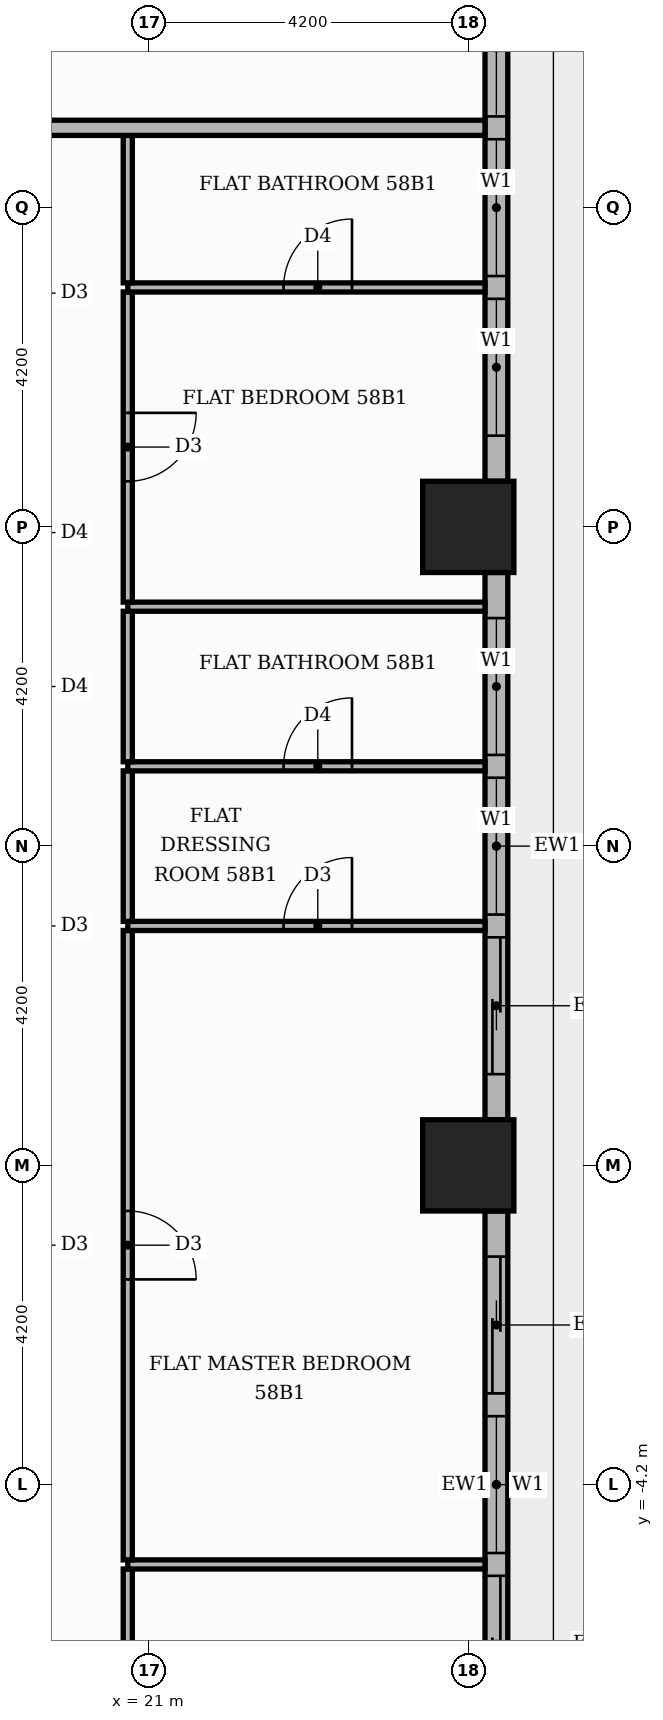
"""IFC4 building model, lengths in metres.
Left out: names, types, materials, properties, quantities, classifications, styles, units other than length and angle.
Written with IfcOpenShell. Run it as: python <this file> out.ifc"""

import sys

from ifc_helpers import new_model, si_unit, direction, frame, frame_2d, origin, origin_2d, place, context, subcontext, project, spatial, rectangle, extrude, element, fill, save


model = new_model("IFC4")
c1 = context("Model", 3, precision=1e-05, world=origin(), true_north=direction((0.0, 1.0)))
c2 = subcontext(c1, "Body", "Model", "MODEL_VIEW")
j1 = project(units=[si_unit("LENGTHUNIT", "METRE"), si_unit("PLANEANGLEUNIT", "RADIAN")], contexts=[c1])
p1 = place(None, origin())
s1 = spatial("IfcSite", under=j1, at=p1, CompositionType="ELEMENT")
p2 = place(p1, origin())
s2 = spatial("IfcBuilding", under=s1, at=p2, CompositionType="ELEMENT")
p3 = place(p2, frame((0.0, 0.0, 244.5)))
s3 = spatial("IfcBuildingStorey", under=s2, at=p3, CompositionType="ELEMENT", Elevation=244.5)
for number, where, z_axis, x_axis in (
    (1, (25.2, 0.0, 0.0), (0.0, 0.0, 1.0), (1.0, 0.0, 0.0)),
    (2, (25.2, 8.4, 0.0), (0.0, 0.0, 1.0), (1.0, 0.0, 0.0)),
):
    element("IfcColumn", number, at=place(p3, frame(where, z_axis=z_axis, x_axis=x_axis)), inside=s3, PredefinedType="COLUMN", context=c2, shape_type="SweptSolid", body=[
        extrude(rectangle(XDim=1.2, YDim=1.2, at=origin_2d()), origin(), (0.0, 0.0, 1.0), 3.9),
    ])
p4 = place(p3, frame((25.57, -7.8, 0.0), z_axis=(0.0, 0.0, 1.0), x_axis=(0.0, 1.0, 0.0)))
e3 = element("IfcWall", 3, at=p4, inside=s3, PredefinedType="STANDARD", context=c2, shape_type="SweptSolid", body=[
    extrude(rectangle(XDim=7.2, YDim=0.3, at=frame_2d((3.6, 0.0))), origin(), (0.0, 0.0, 1.0), 3.48),
])
p5 = place(p4, frame((0.6, 0.0, 0.0)))
e4 = element("IfcOpeningElement", 4, at=p5, cuts=e3, PredefinedType="OPENING", context=c2, shape_type="SweptSolid", body=[
    extrude(rectangle(XDim=1.8, YDim=2.4, at=frame_2d((0.9, 1.2))), frame((0.0, 0.16, 0.0), z_axis=(0.0, -1.0, 0.0), x_axis=(1.0, 0.0, 0.0)), (0.0, 0.0, 1.0), 0.32),
])
p6 = place(p4, frame((2.7, 0.0, 0.9)))
e5 = element("IfcOpeningElement", 5, at=p6, cuts=e3, PredefinedType="OPENING", context=c2, shape_type="SweptSolid", body=[
    extrude(rectangle(XDim=1.8, YDim=2.1, at=frame_2d((0.9, 1.05))), frame((0.0, 0.16, 0.0), z_axis=(0.0, -1.0, 0.0), x_axis=(1.0, 0.0, 0.0)), (0.0, 0.0, 1.0), 0.32),
])
p7 = place(p4, frame((4.8, 0.0, 0.0)))
e6 = element("IfcOpeningElement", 6, at=p7, cuts=e3, PredefinedType="OPENING", context=c2, shape_type="SweptSolid", body=[
    extrude(rectangle(XDim=1.8, YDim=2.4, at=frame_2d((0.9, 1.2))), frame((0.0, 0.16, 0.0), z_axis=(0.0, -1.0, 0.0), x_axis=(1.0, 0.0, 0.0)), (0.0, 0.0, 1.0), 0.32),
])
p8 = place(p3, frame((25.57, 0.6, 0.0), z_axis=(0.0, 0.0, 1.0), x_axis=(0.0, 1.0, 0.0)))
e7 = element("IfcWall", 7, at=p8, inside=s3, PredefinedType="STANDARD", context=c2, shape_type="SweptSolid", body=[
    extrude(rectangle(XDim=7.2, YDim=0.3, at=frame_2d((3.6, 0.0))), origin(), (0.0, 0.0, 1.0), 3.48),
])
p9 = place(p8, frame((0.6, 0.0, 0.0)))
e8 = element("IfcOpeningElement", 8, at=p9, cuts=e7, PredefinedType="OPENING", context=c2, shape_type="SweptSolid", body=[
    extrude(rectangle(XDim=1.8, YDim=2.4, at=frame_2d((0.9, 1.2))), frame((0.0, 0.16, 0.0), z_axis=(0.0, -1.0, 0.0), x_axis=(1.0, 0.0, 0.0)), (0.0, 0.0, 1.0), 0.32),
])
p10 = place(p8, frame((2.7, 0.0, 0.9)))
e9 = element("IfcOpeningElement", 9, at=p10, cuts=e7, PredefinedType="OPENING", context=c2, shape_type="SweptSolid", body=[
    extrude(rectangle(XDim=1.8, YDim=2.1, at=frame_2d((0.9, 1.05))), frame((0.0, 0.16, 0.0), z_axis=(0.0, -1.0, 0.0), x_axis=(1.0, 0.0, 0.0)), (0.0, 0.0, 1.0), 0.32),
])
p11 = place(p8, frame((4.8, 0.0, 0.9)))
e10 = element("IfcOpeningElement", 10, at=p11, cuts=e7, PredefinedType="OPENING", context=c2, shape_type="SweptSolid", body=[
    extrude(rectangle(XDim=1.8, YDim=2.1, at=frame_2d((0.9, 1.05))), frame((0.0, 0.16, 0.0), z_axis=(0.0, -1.0, 0.0), x_axis=(1.0, 0.0, 0.0)), (0.0, 0.0, 1.0), 0.32),
])
p12 = place(p3, frame((25.57, 9.0, 0.0), z_axis=(0.0, 0.0, 1.0), x_axis=(0.0, 1.0, 0.0)))
e11 = element("IfcWall", 11, at=p12, inside=s3, PredefinedType="STANDARD", context=c2, shape_type="SweptSolid", body=[
    extrude(rectangle(XDim=7.2, YDim=0.3, at=frame_2d((3.6, 0.0))), origin(), (0.0, 0.0, 1.0), 3.48),
])
p13 = place(p12, frame((0.6, 0.0, 0.9)))
e12 = element("IfcOpeningElement", 12, at=p13, cuts=e11, PredefinedType="OPENING", context=c2, shape_type="SweptSolid", body=[
    extrude(rectangle(XDim=1.8, YDim=2.1, at=frame_2d((0.9, 1.05))), frame((0.0, 0.16, 0.0), z_axis=(0.0, -1.0, 0.0), x_axis=(1.0, 0.0, 0.0)), (0.0, 0.0, 1.0), 0.32),
])
p14 = place(p12, frame((2.7, 0.0, 0.9)))
e13 = element("IfcOpeningElement", 13, at=p14, cuts=e11, PredefinedType="OPENING", context=c2, shape_type="SweptSolid", body=[
    extrude(rectangle(XDim=1.8, YDim=2.1, at=frame_2d((0.9, 1.05))), frame((0.0, 0.16, 0.0), z_axis=(0.0, -1.0, 0.0), x_axis=(1.0, 0.0, 0.0)), (0.0, 0.0, 1.0), 0.32),
])
p15 = place(p12, frame((4.8, 0.0, 0.9)))
e14 = element("IfcOpeningElement", 14, at=p15, cuts=e11, PredefinedType="OPENING", context=c2, shape_type="SweptSolid", body=[
    extrude(rectangle(XDim=1.8, YDim=2.1, at=frame_2d((0.9, 1.05))), frame((0.0, 0.16, 0.0), z_axis=(0.0, -1.0, 0.0), x_axis=(1.0, 0.0, 0.0)), (0.0, 0.0, 1.0), 0.32),
])
p16 = place(p3, frame((20.72, -11.49, 0.0), z_axis=(0.0, 0.0, 1.0), x_axis=(0.0, 1.0, 0.0)))
e15 = element("IfcWall", 15, at=p16, inside=s3, PredefinedType="PARTITIONING", context=c2, shape_type="SweptSolid", body=[
    extrude(rectangle(XDim=6.18, YDim=0.12, at=frame_2d((3.09, 0.0))), origin(), (0.0, 0.0, 1.0), 3.48),
])
p17 = place(p16, frame((2.59, 0.0, 0.0)))
e16 = element("IfcOpeningElement", 16, at=p17, cuts=e15, PredefinedType="OPENING", context=c2, shape_type="SweptSolid", body=[
    extrude(rectangle(XDim=1.0, YDim=2.1, at=frame_2d((0.5, 1.05))), frame((0.0, 0.07, 0.0), z_axis=(0.0, -1.0, 0.0), x_axis=(1.0, 0.0, 0.0)), (0.0, 0.0, 1.0), 0.14),
])
p18 = place(p3, frame((20.72, -5.25, 0.0), z_axis=(0.0, 0.0, 1.0), x_axis=(1.0, 0.0, 0.0)))
e17 = element("IfcWall", 17, at=p18, inside=s3, PredefinedType="PARTITIONING", context=c2, shape_type="SweptSolid", body=[
    extrude(rectangle(XDim=4.7, YDim=0.12, at=frame_2d((2.35, 0.0))), origin(), (0.0, 0.0, 1.0), 3.48),
])
p19 = place(p3, frame((20.72, -5.19, 0.0), z_axis=(0.0, 0.0, 1.0), x_axis=(0.0, 1.0, 0.0)))
e18 = element("IfcWall", 18, at=p19, inside=s3, PredefinedType="PARTITIONING", context=c2, shape_type="SweptSolid", body=[
    extrude(rectangle(XDim=8.28, YDim=0.12, at=frame_2d((4.14, 0.0))), origin(), (0.0, 0.0, 1.0), 3.48),
])
p20 = place(p19, frame((3.69, 0.0, 0.0)))
e19 = element("IfcOpeningElement", 19, at=p20, cuts=e18, PredefinedType="OPENING", context=c2, shape_type="SweptSolid", body=[
    extrude(rectangle(XDim=0.9, YDim=2.1, at=frame_2d((0.45, 1.05))), frame((0.0, 0.07, 0.0), z_axis=(0.0, -1.0, 0.0), x_axis=(1.0, 0.0, 0.0)), (0.0, 0.0, 1.0), 0.14),
])
p21 = place(p3, frame((20.72, 3.15, 0.0), z_axis=(0.0, 0.0, 1.0), x_axis=(1.0, 0.0, 0.0)))
e20 = element("IfcWall", 20, at=p21, inside=s3, PredefinedType="PARTITIONING", context=c2, shape_type="SweptSolid", body=[
    extrude(rectangle(XDim=4.7, YDim=0.12, at=frame_2d((2.35, 0.0))), origin(), (0.0, 0.0, 1.0), 3.48),
])
p22 = place(p21, frame((2.05, 0.0, 0.0)))
e21 = element("IfcOpeningElement", 21, at=p22, cuts=e20, PredefinedType="OPENING", context=c2, shape_type="SweptSolid", body=[
    extrude(rectangle(XDim=0.9, YDim=2.1, at=frame_2d((0.45, 1.05))), frame((0.0, 0.07, 0.0), z_axis=(0.0, -1.0, 0.0), x_axis=(1.0, 0.0, 0.0)), (0.0, 0.0, 1.0), 0.14),
])
p23 = place(p3, frame((20.72, 3.21, 0.0), z_axis=(0.0, 0.0, 1.0), x_axis=(0.0, 1.0, 0.0)))
e22 = element("IfcWall", 22, at=p23, inside=s3, PredefinedType="PARTITIONING", context=c2, shape_type="SweptSolid", body=[
    extrude(rectangle(XDim=1.98, YDim=0.12, at=frame_2d((0.99, 0.0))), origin(), (0.0, 0.0, 1.0), 3.48),
])
p24 = place(p3, frame((20.72, 5.25, 0.0), z_axis=(0.0, 0.0, 1.0), x_axis=(1.0, 0.0, 0.0)))
e23 = element("IfcWall", 23, at=p24, inside=s3, PredefinedType="PARTITIONING", context=c2, shape_type="SweptSolid", body=[
    extrude(rectangle(XDim=4.7, YDim=0.12, at=frame_2d((2.35, 0.0))), origin(), (0.0, 0.0, 1.0), 3.48),
])
p25 = place(p24, frame((2.05, 0.0, 0.0)))
e24 = element("IfcOpeningElement", 24, at=p25, cuts=e23, PredefinedType="OPENING", context=c2, shape_type="SweptSolid", body=[
    extrude(rectangle(XDim=0.9, YDim=2.1, at=frame_2d((0.45, 1.05))), frame((0.0, 0.07, 0.0), z_axis=(0.0, -1.0, 0.0), x_axis=(1.0, 0.0, 0.0)), (0.0, 0.0, 1.0), 0.14),
])
p26 = place(p3, frame((20.72, 5.31, 0.0), z_axis=(0.0, 0.0, 1.0), x_axis=(0.0, 1.0, 0.0)))
e25 = element("IfcWall", 25, at=p26, inside=s3, PredefinedType="PARTITIONING", context=c2, shape_type="SweptSolid", body=[
    extrude(rectangle(XDim=1.98, YDim=0.12, at=frame_2d((0.99, 0.0))), origin(), (0.0, 0.0, 1.0), 3.48),
])
p27 = place(p3, frame((20.72, 7.35, 0.0), z_axis=(0.0, 0.0, 1.0), x_axis=(1.0, 0.0, 0.0)))
e26 = element("IfcWall", 26, at=p27, inside=s3, PredefinedType="PARTITIONING", context=c2, shape_type="SweptSolid", body=[
    extrude(rectangle(XDim=4.7, YDim=0.12, at=frame_2d((2.35, 0.0))), origin(), (0.0, 0.0, 1.0), 3.48),
])
p28 = place(p3, frame((20.72, 7.41, 0.0), z_axis=(0.0, 0.0, 1.0), x_axis=(0.0, 1.0, 0.0)))
e27 = element("IfcWall", 27, at=p28, inside=s3, PredefinedType="PARTITIONING", context=c2, shape_type="SweptSolid", body=[
    extrude(rectangle(XDim=4.08, YDim=0.12, at=frame_2d((2.04, 0.0))), origin(), (0.0, 0.0, 1.0), 3.48),
])
p29 = place(p28, frame((1.59, 0.0, 0.0)))
e28 = element("IfcOpeningElement", 28, at=p29, cuts=e27, PredefinedType="OPENING", context=c2, shape_type="SweptSolid", body=[
    extrude(rectangle(XDim=0.9, YDim=2.1, at=frame_2d((0.45, 1.05))), frame((0.0, 0.07, 0.0), z_axis=(0.0, -1.0, 0.0), x_axis=(1.0, 0.0, 0.0)), (0.0, 0.0, 1.0), 0.14),
])
p30 = place(p3, frame((20.72, 11.55, 0.0), z_axis=(0.0, 0.0, 1.0), x_axis=(1.0, 0.0, 0.0)))
e29 = element("IfcWall", 29, at=p30, inside=s3, PredefinedType="PARTITIONING", context=c2, shape_type="SweptSolid", body=[
    extrude(rectangle(XDim=4.7, YDim=0.12, at=frame_2d((2.35, 0.0))), origin(), (0.0, 0.0, 1.0), 3.48),
])
p31 = place(p30, frame((2.05, 0.0, 0.0)))
e30 = element("IfcOpeningElement", 30, at=p31, cuts=e29, PredefinedType="OPENING", context=c2, shape_type="SweptSolid", body=[
    extrude(rectangle(XDim=0.9, YDim=2.1, at=frame_2d((0.45, 1.05))), frame((0.0, 0.07, 0.0), z_axis=(0.0, -1.0, 0.0), x_axis=(1.0, 0.0, 0.0)), (0.0, 0.0, 1.0), 0.14),
])
p32 = place(p3, frame((20.72, 11.61, 0.0), z_axis=(0.0, 0.0, 1.0), x_axis=(0.0, 1.0, 0.0)))
e31 = element("IfcWall", 31, at=p32, inside=s3, PredefinedType="PARTITIONING", context=c2, shape_type="SweptSolid", body=[
    extrude(rectangle(XDim=1.94, YDim=0.12, at=frame_2d((0.97, 0.0))), origin(), (0.0, 0.0, 1.0), 3.48),
])
p33 = place(p3, frame((-13.65, 13.65, 0.0), z_axis=(0.0, 0.0, 1.0), x_axis=(1.0, 0.0, 0.0)))
e32 = element("IfcWall", 32, at=p33, inside=s3, PredefinedType="PARTITIONING", context=c2, shape_type="SweptSolid", body=[
    extrude(rectangle(XDim=39.07, YDim=0.2, at=frame_2d((19.535, 0.0))), origin(), (0.0, 0.0, 1.0), 3.48),
])
p34 = place(p33, frame((24.65, 0.0, 0.0)))
e33 = element("IfcOpeningElement", 33, at=p34, cuts=e32, PredefinedType="OPENING", context=c2, shape_type="SweptSolid", body=[
    extrude(rectangle(XDim=1.1, YDim=2.4, at=frame_2d((0.55, 1.2))), frame((0.0, 0.11, 0.0), z_axis=(0.0, -1.0, 0.0), x_axis=(1.0, 0.0, 0.0)), (0.0, 0.0, 1.0), 0.22),
])
p35 = place(p33, frame((12.05, 0.0, 0.0)))
e34 = element("IfcOpeningElement", 34, at=p35, cuts=e32, PredefinedType="OPENING", context=c2, shape_type="SweptSolid", body=[
    extrude(rectangle(XDim=1.1, YDim=2.4, at=frame_2d((0.55, 1.2))), frame((0.0, 0.11, 0.0), z_axis=(0.0, -1.0, 0.0), x_axis=(1.0, 0.0, 0.0)), (0.0, 0.0, 1.0), 0.22),
])
p36 = place(p5, origin())
e35 = element("IfcDoor", 35, at=p36, inside=s3, OperationType="SLIDING_TO_LEFT", PredefinedType="DOOR", context=c2, shape_type="SweptSolid", body=[
    extrude(rectangle(XDim=1.8, YDim=2.4, at=frame_2d((0.9, 1.2))), frame((0.0, 0.025, 0.0), z_axis=(0.0, -1.0, 0.0), x_axis=(1.0, 0.0, 0.0)), (0.0, 0.0, 1.0), 0.05),
])
fill(e4, e35)
p37 = place(p6, origin())
e36 = element("IfcWindow", 36, at=p37, inside=s3, PartitioningType="SINGLE_PANEL", PredefinedType="WINDOW", context=c2, shape_type="SweptSolid", body=[
    extrude(rectangle(XDim=1.8, YDim=2.1, at=frame_2d((0.9, 1.05))), frame((0.0, 0.03, 0.0), z_axis=(0.0, -1.0, 0.0), x_axis=(1.0, 0.0, 0.0)), (0.0, 0.0, 1.0), 0.06),
])
fill(e5, e36)
p38 = place(p7, origin())
e37 = element("IfcDoor", 37, at=p38, inside=s3, OperationType="SLIDING_TO_RIGHT", PredefinedType="DOOR", context=c2, shape_type="SweptSolid", body=[
    extrude(rectangle(XDim=1.8, YDim=2.4, at=frame_2d((0.9, 1.2))), frame((0.0, 0.025, 0.0), z_axis=(0.0, -1.0, 0.0), x_axis=(1.0, 0.0, 0.0)), (0.0, 0.0, 1.0), 0.05),
])
fill(e6, e37)
p39 = place(p9, origin())
e38 = element("IfcDoor", 38, at=p39, inside=s3, OperationType="SLIDING_TO_LEFT", PredefinedType="DOOR", context=c2, shape_type="SweptSolid", body=[
    extrude(rectangle(XDim=1.8, YDim=2.4, at=frame_2d((0.9, 1.2))), frame((0.0, 0.025, 0.0), z_axis=(0.0, -1.0, 0.0), x_axis=(1.0, 0.0, 0.0)), (0.0, 0.0, 1.0), 0.05),
])
fill(e8, e38)
p40 = place(p10, origin())
e39 = element("IfcWindow", 39, at=p40, inside=s3, PartitioningType="SINGLE_PANEL", PredefinedType="WINDOW", context=c2, shape_type="SweptSolid", body=[
    extrude(rectangle(XDim=1.8, YDim=2.1, at=frame_2d((0.9, 1.05))), frame((0.0, 0.03, 0.0), z_axis=(0.0, -1.0, 0.0), x_axis=(1.0, 0.0, 0.0)), (0.0, 0.0, 1.0), 0.06),
])
fill(e9, e39)
p41 = place(p11, origin())
e40 = element("IfcWindow", 40, at=p41, inside=s3, PartitioningType="SINGLE_PANEL", PredefinedType="WINDOW", context=c2, shape_type="SweptSolid", body=[
    extrude(rectangle(XDim=1.8, YDim=2.1, at=frame_2d((0.9, 1.05))), frame((0.0, 0.03, 0.0), z_axis=(0.0, -1.0, 0.0), x_axis=(1.0, 0.0, 0.0)), (0.0, 0.0, 1.0), 0.06),
])
fill(e10, e40)
p42 = place(p13, origin())
e41 = element("IfcWindow", 41, at=p42, inside=s3, PartitioningType="SINGLE_PANEL", PredefinedType="WINDOW", context=c2, shape_type="SweptSolid", body=[
    extrude(rectangle(XDim=1.8, YDim=2.1, at=frame_2d((0.9, 1.05))), frame((0.0, 0.03, 0.0), z_axis=(0.0, -1.0, 0.0), x_axis=(1.0, 0.0, 0.0)), (0.0, 0.0, 1.0), 0.06),
])
fill(e12, e41)
p43 = place(p14, origin())
e42 = element("IfcWindow", 42, at=p43, inside=s3, PartitioningType="SINGLE_PANEL", PredefinedType="WINDOW", context=c2, shape_type="SweptSolid", body=[
    extrude(rectangle(XDim=1.8, YDim=2.1, at=frame_2d((0.9, 1.05))), frame((0.0, 0.03, 0.0), z_axis=(0.0, -1.0, 0.0), x_axis=(1.0, 0.0, 0.0)), (0.0, 0.0, 1.0), 0.06),
])
fill(e13, e42)
p44 = place(p15, origin())
e43 = element("IfcWindow", 43, at=p44, inside=s3, PartitioningType="SINGLE_PANEL", PredefinedType="WINDOW", context=c2, shape_type="SweptSolid", body=[
    extrude(rectangle(XDim=1.8, YDim=2.1, at=frame_2d((0.9, 1.05))), frame((0.0, 0.03, 0.0), z_axis=(0.0, -1.0, 0.0), x_axis=(1.0, 0.0, 0.0)), (0.0, 0.0, 1.0), 0.06),
])
fill(e14, e43)
p45 = place(p20, frame((0.9, 0.0, 0.0), z_axis=(0.0, 0.0, 1.0), x_axis=(-1.0, 0.0, 0.0)))
e44 = element("IfcDoor", 44, at=p45, inside=s3, OperationType="SINGLE_SWING_LEFT", PredefinedType="DOOR", context=c2, shape_type="SweptSolid", body=[
    extrude(rectangle(XDim=0.9, YDim=2.1, at=frame_2d((0.45, 1.05))), frame((0.0, 0.025, 0.0), z_axis=(0.0, -1.0, 0.0), x_axis=(1.0, 0.0, 0.0)), (0.0, 0.0, 1.0), 0.05),
])
fill(e19, e44)
p46 = place(p22, origin())
e45 = element("IfcDoor", 45, at=p46, inside=s3, OperationType="SINGLE_SWING_RIGHT", PredefinedType="DOOR", context=c2, shape_type="SweptSolid", body=[
    extrude(rectangle(XDim=0.9, YDim=2.1, at=frame_2d((0.45, 1.05))), frame((0.0, 0.025, 0.0), z_axis=(0.0, -1.0, 0.0), x_axis=(1.0, 0.0, 0.0)), (0.0, 0.0, 1.0), 0.05),
])
fill(e21, e45)
p47 = place(p25, origin())
e46 = element("IfcDoor", 46, at=p47, inside=s3, OperationType="SINGLE_SWING_RIGHT", PredefinedType="DOOR", context=c2, shape_type="SweptSolid", body=[
    extrude(rectangle(XDim=0.9, YDim=2.1, at=frame_2d((0.45, 1.05))), frame((0.0, 0.025, 0.0), z_axis=(0.0, -1.0, 0.0), x_axis=(1.0, 0.0, 0.0)), (0.0, 0.0, 1.0), 0.05),
])
fill(e24, e46)
p48 = place(p29, frame((0.9, 0.0, 0.0), z_axis=(0.0, 0.0, 1.0), x_axis=(-1.0, 0.0, 0.0)))
e47 = element("IfcDoor", 47, at=p48, inside=s3, OperationType="SINGLE_SWING_RIGHT", PredefinedType="DOOR", context=c2, shape_type="SweptSolid", body=[
    extrude(rectangle(XDim=0.9, YDim=2.1, at=frame_2d((0.45, 1.05))), frame((0.0, 0.025, 0.0), z_axis=(0.0, -1.0, 0.0), x_axis=(1.0, 0.0, 0.0)), (0.0, 0.0, 1.0), 0.05),
])
fill(e28, e47)
p49 = place(p31, origin())
e48 = element("IfcDoor", 48, at=p49, inside=s3, OperationType="SINGLE_SWING_RIGHT", PredefinedType="DOOR", context=c2, shape_type="SweptSolid", body=[
    extrude(rectangle(XDim=0.9, YDim=2.1, at=frame_2d((0.45, 1.05))), frame((0.0, 0.025, 0.0), z_axis=(0.0, -1.0, 0.0), x_axis=(1.0, 0.0, 0.0)), (0.0, 0.0, 1.0), 0.05),
])
fill(e30, e48)
save(model, sys.argv[1])
